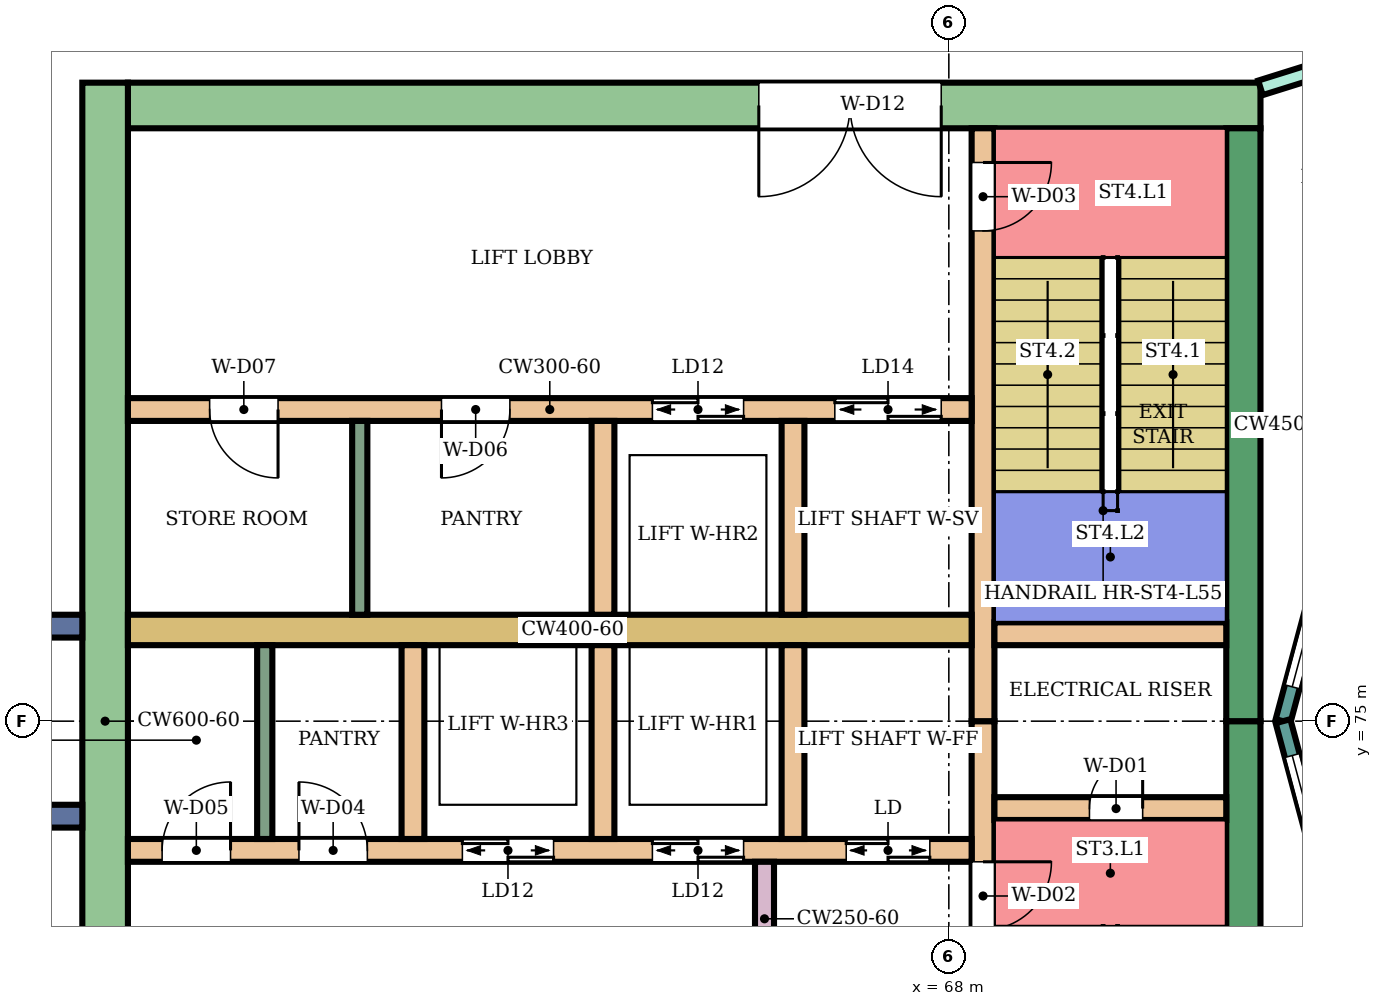
"""IFC4 building model, lengths in metres.
Left out: names, types, materials, properties, quantities, classifications, styles, units other than length and angle.
Written with IfcOpenShell. Run it as: python <this file> out.ifc"""

import sys

from ifc_helpers import new_model, si_unit, direction, frame, frame_2d, origin, place, context, subcontext, project, spatial, rectangle, extrude, element, fill, save


model = new_model("IFC4")
c1 = context("Model", 3, precision=1e-05, world=origin(), true_north=direction((0.0, 1.0)))
c2 = subcontext(c1, "Body", "Model", "MODEL_VIEW")
j1 = project(units=[si_unit("LENGTHUNIT", "METRE"), si_unit("PLANEANGLEUNIT", "RADIAN")], contexts=[c1])
p1 = place(None, origin())
s1 = spatial("IfcSite", under=j1, at=p1, CompositionType="ELEMENT")
p2 = place(p1, origin())
s2 = spatial("IfcBuilding", under=s1, at=p2, CompositionType="ELEMENT")
p3 = place(p2, frame((0.0, 0.0, 241.5)))
s3 = spatial("IfcBuildingStorey", under=s2, at=p3, CompositionType="ELEMENT", Elevation=241.5)
p4 = place(p3, frame((72.1, 83.1, 0.0), z_axis=(0.0, 0.0, 1.0), x_axis=(-1.0, 0.0, 0.0)))
e1 = element("IfcWall", 1, at=p4, inside=s3, PredefinedType="SHEAR", context=c2, shape_type="SweptSolid", body=[
    extrude(rectangle(XDim=14.9, YDim=0.6, at=frame_2d((7.45, 0.0))), origin(), (0.0, 0.0, 1.0), 3.88),
])
p5 = place(p4, frame((4.2, 0.0, 0.0)))
e2 = element("IfcOpeningElement", 2, at=p5, cuts=e1, PredefinedType="OPENING", context=c2, shape_type="SweptSolid", body=[
    extrude(rectangle(XDim=2.4, YDim=2.4, at=frame_2d((1.2, 1.2))), frame((0.0, 0.31, 0.0), z_axis=(0.0, -1.0, 0.0), x_axis=(1.0, 0.0, 0.0)), (0.0, 0.0, 1.0), 0.62),
])
for number, where, z_axis, x_axis in (
    (3, (71.875, 75.0, 0.0), (0.0, 0.0, 1.0), (0.0, -1.0, 0.0)),
    (4, (71.875, 82.8, 0.0), (0.0, 0.0, 1.0), (0.0, -1.0, 0.0)),
):
    element("IfcWall", number, at=place(p3, frame(where, z_axis=z_axis, x_axis=x_axis)), inside=s3, PredefinedType="SHEAR", context=c2, shape_type="SweptSolid", body=[
        extrude(rectangle(XDim=7.8, YDim=0.45, at=frame_2d((3.9, 0.0))), origin(), (0.0, 0.0, 1.0), 3.88),
    ])
p6 = place(p3, frame((56.9, 83.4, 0.0), z_axis=(0.0, 0.0, 1.0), x_axis=(0.0, -1.0, 0.0)))
e5 = element("IfcWall", 5, at=p6, inside=s3, PredefinedType="SHEAR", context=c2, shape_type="SweptSolid", body=[
    extrude(rectangle(XDim=16.8, YDim=0.6, at=frame_2d((8.4, 0.0))), origin(), (0.0, 0.0, 1.0), 3.88),
])
p7 = place(p3, frame((68.45, 75.0, 0.0), z_axis=(0.0, 0.0, 1.0), x_axis=(0.0, -1.0, 0.0)))
e6 = element("IfcWall", 6, at=p7, inside=s3, PredefinedType="SHEAR", context=c2, shape_type="SweptSolid", body=[
    extrude(rectangle(XDim=7.8, YDim=0.3, at=frame_2d((3.9, 0.0))), origin(), (0.0, 0.0, 1.0), 3.88),
])
p8 = place(p7, frame((1.85, 0.0, 0.0)))
e7 = element("IfcOpeningElement", 7, at=p8, cuts=e6, PredefinedType="OPENING", context=c2, shape_type="SweptSolid", body=[
    extrude(rectangle(XDim=0.9, YDim=2.1, at=frame_2d((0.45, 1.05))), frame((0.0, 0.16, 0.0), z_axis=(0.0, -1.0, 0.0), x_axis=(1.0, 0.0, 0.0)), (0.0, 0.0, 1.0), 0.32),
])
p9 = place(p3, frame((68.45, 82.8, 0.0), z_axis=(0.0, 0.0, 1.0), x_axis=(0.0, -1.0, 0.0)))
e8 = element("IfcWall", 8, at=p9, inside=s3, PredefinedType="SHEAR", context=c2, shape_type="SweptSolid", body=[
    extrude(rectangle(XDim=7.8, YDim=0.3, at=frame_2d((3.9, 0.0))), origin(), (0.0, 0.0, 1.0), 3.88),
])
p10 = place(p9, frame((0.45, 0.0, 0.0)))
e9 = element("IfcOpeningElement", 9, at=p10, cuts=e8, PredefinedType="OPENING", context=c2, shape_type="SweptSolid", body=[
    extrude(rectangle(XDim=0.9, YDim=2.1, at=frame_2d((0.45, 1.05))), frame((0.0, 0.16, 0.0), z_axis=(0.0, -1.0, 0.0), x_axis=(1.0, 0.0, 0.0)), (0.0, 0.0, 1.0), 0.32),
])
p11 = place(p3, frame((71.65, 73.85, 0.0), z_axis=(0.0, 0.0, 1.0), x_axis=(-1.0, 0.0, 0.0)))
e10 = element("IfcWall", 10, at=p11, inside=s3, PredefinedType="SHEAR", context=c2, shape_type="SweptSolid", body=[
    extrude(rectangle(XDim=3.05, YDim=0.3, at=frame_2d((1.525, 0.0))), origin(), (0.0, 0.0, 1.0), 3.88),
])
p12 = place(p11, frame((1.1, 0.0, 0.0)))
e11 = element("IfcOpeningElement", 11, at=p12, cuts=e10, PredefinedType="OPENING", context=c2, shape_type="SweptSolid", body=[
    extrude(rectangle(XDim=0.7, YDim=2.0, at=frame_2d((0.35, 1.0))), frame((0.0, 0.16, 0.0), z_axis=(0.0, -1.0, 0.0), x_axis=(1.0, 0.0, 0.0)), (0.0, 0.0, 1.0), 0.32),
])
p13 = place(p3, frame((71.65, 76.15, 0.0), z_axis=(0.0, 0.0, 1.0), x_axis=(-1.0, 0.0, 0.0)))
e12 = element("IfcWall", 12, at=p13, inside=s3, PredefinedType="SHEAR", context=c2, shape_type="SweptSolid", body=[
    extrude(rectangle(XDim=3.05, YDim=0.3, at=frame_2d((1.525, 0.0))), origin(), (0.0, 0.0, 1.0), 3.88),
])
p14 = place(p3, frame((68.3, 73.3, 0.0), z_axis=(0.0, 0.0, 1.0), x_axis=(-1.0, 0.0, 0.0)))
e13 = element("IfcWall", 13, at=p14, inside=s3, PredefinedType="SHEAR", context=c2, shape_type="SweptSolid", body=[
    extrude(rectangle(XDim=11.1, YDim=0.3, at=frame_2d((5.55, 0.0))), origin(), (0.0, 0.0, 1.0), 3.88),
])
p15 = place(p14, frame((0.55, 0.0, 0.0)))
e14 = element("IfcOpeningElement", 14, at=p15, cuts=e13, PredefinedType="OPENING", context=c2, shape_type="SweptSolid", body=[
    extrude(rectangle(XDim=1.1, YDim=2.1, at=frame_2d((0.55, 1.05))), frame((0.0, 0.16, 0.0), z_axis=(0.0, -1.0, 0.0), x_axis=(1.0, 0.0, 0.0)), (0.0, 0.0, 1.0), 0.32),
])
p16 = place(p14, frame((3.0, 0.0, 0.0)))
e15 = element("IfcOpeningElement", 15, at=p16, cuts=e13, PredefinedType="OPENING", context=c2, shape_type="SweptSolid", body=[
    extrude(rectangle(XDim=1.2, YDim=2.1, at=frame_2d((0.6, 1.05))), frame((0.0, 0.16, 0.0), z_axis=(0.0, -1.0, 0.0), x_axis=(1.0, 0.0, 0.0)), (0.0, 0.0, 1.0), 0.32),
])
p17 = place(p14, frame((5.5, 0.0, 0.0)))
e16 = element("IfcOpeningElement", 16, at=p17, cuts=e13, PredefinedType="OPENING", context=c2, shape_type="SweptSolid", body=[
    extrude(rectangle(XDim=1.2, YDim=2.1, at=frame_2d((0.6, 1.05))), frame((0.0, 0.16, 0.0), z_axis=(0.0, -1.0, 0.0), x_axis=(1.0, 0.0, 0.0)), (0.0, 0.0, 1.0), 0.32),
])
p18 = place(p14, frame((7.95, 0.0, 0.0)))
e17 = element("IfcOpeningElement", 17, at=p18, cuts=e13, PredefinedType="OPENING", context=c2, shape_type="SweptSolid", body=[
    extrude(rectangle(XDim=0.9, YDim=2.1, at=frame_2d((0.45, 1.05))), frame((0.0, 0.16, 0.0), z_axis=(0.0, -1.0, 0.0), x_axis=(1.0, 0.0, 0.0)), (0.0, 0.0, 1.0), 0.32),
])
p19 = place(p14, frame((9.75, 0.0, 0.0)))
e18 = element("IfcOpeningElement", 18, at=p19, cuts=e13, PredefinedType="OPENING", context=c2, shape_type="SweptSolid", body=[
    extrude(rectangle(XDim=0.9, YDim=2.1, at=frame_2d((0.45, 1.05))), frame((0.0, 0.16, 0.0), z_axis=(0.0, -1.0, 0.0), x_axis=(1.0, 0.0, 0.0)), (0.0, 0.0, 1.0), 0.32),
])
p20 = place(p3, frame((68.3, 76.2, 0.0), z_axis=(0.0, 0.0, 1.0), x_axis=(-1.0, 0.0, 0.0)))
e19 = element("IfcWall", 19, at=p20, inside=s3, PredefinedType="SHEAR", context=c2, shape_type="SweptSolid", body=[
    extrude(rectangle(XDim=11.1, YDim=0.4, at=frame_2d((5.55, 0.0))), origin(), (0.0, 0.0, 1.0), 3.88),
])
p21 = place(p3, frame((68.3, 79.1, 0.0), z_axis=(0.0, 0.0, 1.0), x_axis=(-1.0, 0.0, 0.0)))
e20 = element("IfcWall", 20, at=p21, inside=s3, PredefinedType="SHEAR", context=c2, shape_type="SweptSolid", body=[
    extrude(rectangle(XDim=11.1, YDim=0.3, at=frame_2d((5.55, 0.0))), origin(), (0.0, 0.0, 1.0), 3.88),
])
p22 = place(p21, frame((0.4, 0.0, 0.0)))
e21 = element("IfcOpeningElement", 21, at=p22, cuts=e20, PredefinedType="OPENING", context=c2, shape_type="SweptSolid", body=[
    extrude(rectangle(XDim=1.4, YDim=2.1, at=frame_2d((0.7, 1.05))), frame((0.0, 0.16, 0.0), z_axis=(0.0, -1.0, 0.0), x_axis=(1.0, 0.0, 0.0)), (0.0, 0.0, 1.0), 0.32),
])
p23 = place(p21, frame((3.0, 0.0, 0.0)))
e22 = element("IfcOpeningElement", 22, at=p23, cuts=e20, PredefinedType="OPENING", context=c2, shape_type="SweptSolid", body=[
    extrude(rectangle(XDim=1.2, YDim=2.1, at=frame_2d((0.6, 1.05))), frame((0.0, 0.16, 0.0), z_axis=(0.0, -1.0, 0.0), x_axis=(1.0, 0.0, 0.0)), (0.0, 0.0, 1.0), 0.32),
])
p24 = place(p21, frame((6.075, 0.0, 0.0)))
e23 = element("IfcOpeningElement", 23, at=p24, cuts=e20, PredefinedType="OPENING", context=c2, shape_type="SweptSolid", body=[
    extrude(rectangle(XDim=0.9, YDim=2.1, at=frame_2d((0.45, 1.05))), frame((0.0, 0.16, 0.0), z_axis=(0.0, -1.0, 0.0), x_axis=(1.0, 0.0, 0.0)), (0.0, 0.0, 1.0), 0.32),
])
p25 = place(p21, frame((9.125, 0.0, 0.0)))
e24 = element("IfcOpeningElement", 24, at=p25, cuts=e20, PredefinedType="OPENING", context=c2, shape_type="SweptSolid", body=[
    extrude(rectangle(XDim=0.9, YDim=2.1, at=frame_2d((0.45, 1.05))), frame((0.0, 0.16, 0.0), z_axis=(0.0, -1.0, 0.0), x_axis=(1.0, 0.0, 0.0)), (0.0, 0.0, 1.0), 0.32),
])
for number, where, z_axis, x_axis in (
    (25, (65.95, 76.0, 0.0), (0.0, 0.0, 1.0), (0.0, -1.0, 0.0)),
    (26, (63.45, 76.0, 0.0), (0.0, 0.0, 1.0), (0.0, -1.0, 0.0)),
    (27, (60.95, 76.0, 0.0), (0.0, 0.0, 1.0), (0.0, -1.0, 0.0)),
    (28, (65.95, 78.95, 0.0), (0.0, 0.0, 1.0), (0.0, -1.0, 0.0)),
    (29, (63.45, 78.95, 0.0), (0.0, 0.0, 1.0), (0.0, -1.0, 0.0)),
):
    element("IfcWall", number, at=place(p3, frame(where, z_axis=z_axis, x_axis=x_axis)), inside=s3, PredefinedType="SHEAR", context=c2, shape_type="SweptSolid", body=[
        extrude(rectangle(XDim=2.55, YDim=0.3, at=frame_2d((1.275, 0.0))), origin(), (0.0, 0.0, 1.0), 3.88),
    ])
p26 = place(p3, frame((65.575, 73.15, 0.0), z_axis=(0.0, 0.0, 1.0), x_axis=(0.0, -1.0, 0.0)))
e30 = element("IfcWall", 30, at=p26, inside=s3, PredefinedType="SHEAR", context=c2, shape_type="SweptSolid", body=[
    extrude(rectangle(XDim=1.5, YDim=0.25, at=frame_2d((0.75, 0.0))), origin(), (0.0, 0.0, 1.0), 3.88),
])
for number, where, z_axis, x_axis in (
    (31, (56.6, 76.25, 0.0), (0.0, 0.0, 1.0), (-1.0, 0.0, 0.0)),
    (32, (56.6, 73.75, 0.0), (0.0, 0.0, 1.0), (-1.0, 0.0, 0.0)),
):
    element("IfcWall", number, at=place(p3, frame(where, z_axis=z_axis, x_axis=x_axis)), inside=s3, PredefinedType="NOTDEFINED", context=c2, shape_type="SweptSolid", body=[
        extrude(rectangle(XDim=2.416, YDim=0.3, at=frame_2d((1.208, 0.0))), origin(), (0.0, 0.0, 1.0), 4.2),
    ])
p27 = place(p3, frame((73.415, 78.802, 0.0), z_axis=(0.0, 0.0, 1.0), x_axis=(-0.258789828301, -0.965933654434, 0.0)))
e33 = element("IfcWall", 33, at=p27, inside=s3, PredefinedType="NOTDEFINED", context=c2, shape_type="SweptSolid", body=[
    extrude(rectangle(XDim=3.936, YDim=0.2, at=frame_2d((1.968, 0.0))), origin(), (0.0, 0.0, 1.0), 4.2),
])
p28 = place(p27, frame((0.468, 0.0, 0.9)))
e34 = element("IfcOpeningElement", 34, at=p28, cuts=e33, PredefinedType="OPENING", context=c2, shape_type="SweptSolid", body=[
    extrude(rectangle(XDim=3.0, YDim=2.3, at=frame_2d((1.5, 1.15))), frame((0.0, 0.11, 0.0), z_axis=(0.0, -1.0, 0.0), x_axis=(1.0, 0.0, 0.0)), (0.0, 0.0, 1.0), 0.22),
])
p29 = place(p3, frame((72.396, 75.0, 0.0), z_axis=(0.0, 0.0, 1.0), x_axis=(0.258789828301, -0.965933654434, 0.0)))
e35 = element("IfcWall", 35, at=p29, inside=s3, PredefinedType="NOTDEFINED", context=c2, shape_type="SweptSolid", body=[
    extrude(rectangle(XDim=3.936, YDim=0.2, at=frame_2d((1.968, 0.0))), origin(), (0.0, 0.0, 1.0), 4.2),
])
p30 = place(p29, frame((0.468, 0.0, 0.9)))
e36 = element("IfcOpeningElement", 36, at=p30, cuts=e35, PredefinedType="OPENING", context=c2, shape_type="SweptSolid", body=[
    extrude(rectangle(XDim=3.0, YDim=2.3, at=frame_2d((1.5, 1.15))), frame((0.0, 0.11, 0.0), z_axis=(0.0, -1.0, 0.0), x_axis=(1.0, 0.0, 0.0)), (0.0, 0.0, 1.0), 0.22),
])
p31 = place(p3, frame((72.1, 83.332, 0.0), z_axis=(0.0, 0.0, 1.0), x_axis=(0.954233106619, 0.299063836383, 0.0)))
e37 = element("IfcWall", 37, at=p31, inside=s3, PredefinedType="PARTITIONING", context=c2, shape_type="SweptSolid", body=[
    extrude(rectangle(XDim=2.414, YDim=0.2, at=frame_2d((1.207, 0.0))), origin(), (0.0, 0.0, 1.0), 3.75),
])
p32 = place(p31, frame((0.762, 0.0, 0.0)))
e38 = element("IfcOpeningElement", 38, at=p32, cuts=e37, PredefinedType="OPENING", context=c2, shape_type="SweptSolid", body=[
    extrude(rectangle(XDim=0.9, YDim=2.1, at=frame_2d((0.45, 1.05))), frame((0.0, 0.11, 0.0), z_axis=(0.0, -1.0, 0.0), x_axis=(1.0, 0.0, 0.0)), (0.0, 0.0, 1.0), 0.22),
])
for number, where, z_axis, x_axis in (
    (39, (59.0, 76.0, 0.0), (0.0, 0.0, 1.0), (0.0, -1.0, 0.0)),
    (40, (60.25, 78.95, 0.0), (0.0, 0.0, 1.0), (0.0, -1.0, 0.0)),
):
    element("IfcWall", number, at=place(p3, frame(where, z_axis=z_axis, x_axis=x_axis)), inside=s3, PredefinedType="PARTITIONING", context=c2, shape_type="SweptSolid", body=[
        extrude(rectangle(XDim=2.55, YDim=0.2, at=frame_2d((1.275, 0.0))), origin(), (0.0, 0.0, 1.0), 3.88),
    ])
p33 = place(p28, origin())
e41 = element("IfcWindow", 41, at=p33, inside=s3, PartitioningType="SINGLE_PANEL", PredefinedType="WINDOW", context=c2, shape_type="SweptSolid", body=[
    extrude(rectangle(XDim=3.0, YDim=2.3, at=frame_2d((1.5, 1.15))), frame((0.0, 0.03, 0.0), z_axis=(0.0, -1.0, 0.0), x_axis=(1.0, 0.0, 0.0)), (0.0, 0.0, 1.0), 0.06),
])
fill(e34, e41)
p34 = place(p30, origin())
e42 = element("IfcWindow", 42, at=p34, inside=s3, PartitioningType="SINGLE_PANEL", PredefinedType="WINDOW", context=c2, shape_type="SweptSolid", body=[
    extrude(rectangle(XDim=3.0, YDim=2.3, at=frame_2d((1.5, 1.15))), frame((0.0, 0.03, 0.0), z_axis=(0.0, -1.0, 0.0), x_axis=(1.0, 0.0, 0.0)), (0.0, 0.0, 1.0), 0.06),
])
fill(e36, e42)
p35 = place(p12, frame((0.7, 0.0, 0.0), z_axis=(0.0, 0.0, 1.0), x_axis=(-1.0, 0.0, 0.0)))
e43 = element("IfcDoor", 43, at=p35, inside=s3, OperationType="SINGLE_SWING_RIGHT", PredefinedType="DOOR", context=c2, shape_type="SweptSolid", body=[
    extrude(rectangle(XDim=0.7, YDim=2.0, at=frame_2d((0.35, 1.0))), frame((0.0, 0.025, 0.0), z_axis=(0.0, -1.0, 0.0), x_axis=(1.0, 0.0, 0.0)), (0.0, 0.0, 1.0), 0.05),
])
fill(e11, e43)
p36 = place(p8, origin())
e44 = element("IfcDoor", 44, at=p36, inside=s3, OperationType="SINGLE_SWING_LEFT", PredefinedType="DOOR", context=c2, shape_type="SweptSolid", body=[
    extrude(rectangle(XDim=0.9, YDim=2.1, at=frame_2d((0.45, 1.05))), frame((0.0, 0.025, 0.0), z_axis=(0.0, -1.0, 0.0), x_axis=(1.0, 0.0, 0.0)), (0.0, 0.0, 1.0), 0.05),
])
fill(e7, e44)
p37 = place(p10, origin())
e45 = element("IfcDoor", 45, at=p37, inside=s3, OperationType="SINGLE_SWING_LEFT", PredefinedType="DOOR", context=c2, shape_type="SweptSolid", body=[
    extrude(rectangle(XDim=0.9, YDim=2.1, at=frame_2d((0.45, 1.05))), frame((0.0, 0.025, 0.0), z_axis=(0.0, -1.0, 0.0), x_axis=(1.0, 0.0, 0.0)), (0.0, 0.0, 1.0), 0.05),
])
fill(e9, e45)
p38 = place(p15, origin())
e46 = element("IfcDoor", 46, at=p38, inside=s3, OperationType="DOUBLE_DOOR_SLIDING", PredefinedType="DOOR", context=c2, shape_type="SweptSolid", body=[
    extrude(rectangle(XDim=1.1, YDim=2.1, at=frame_2d((0.55, 1.05))), frame((0.0, 0.025, 0.0), z_axis=(0.0, -1.0, 0.0), x_axis=(1.0, 0.0, 0.0)), (0.0, 0.0, 1.0), 0.05),
])
fill(e14, e46)
p39 = place(p16, origin())
e47 = element("IfcDoor", 47, at=p39, inside=s3, OperationType="DOUBLE_DOOR_SLIDING", PredefinedType="DOOR", context=c2, shape_type="SweptSolid", body=[
    extrude(rectangle(XDim=1.2, YDim=2.1, at=frame_2d((0.6, 1.05))), frame((0.0, 0.025, 0.0), z_axis=(0.0, -1.0, 0.0), x_axis=(1.0, 0.0, 0.0)), (0.0, 0.0, 1.0), 0.05),
])
fill(e15, e47)
p40 = place(p17, origin())
e48 = element("IfcDoor", 48, at=p40, inside=s3, OperationType="DOUBLE_DOOR_SLIDING", PredefinedType="DOOR", context=c2, shape_type="SweptSolid", body=[
    extrude(rectangle(XDim=1.2, YDim=2.1, at=frame_2d((0.6, 1.05))), frame((0.0, 0.025, 0.0), z_axis=(0.0, -1.0, 0.0), x_axis=(1.0, 0.0, 0.0)), (0.0, 0.0, 1.0), 0.05),
])
fill(e16, e48)
p41 = place(p18, frame((0.9, 0.0, 0.0), z_axis=(0.0, 0.0, 1.0), x_axis=(-1.0, 0.0, 0.0)))
e49 = element("IfcDoor", 49, at=p41, inside=s3, OperationType="SINGLE_SWING_LEFT", PredefinedType="DOOR", context=c2, shape_type="SweptSolid", body=[
    extrude(rectangle(XDim=0.9, YDim=2.1, at=frame_2d((0.45, 1.05))), frame((0.0, 0.025, 0.0), z_axis=(0.0, -1.0, 0.0), x_axis=(1.0, 0.0, 0.0)), (0.0, 0.0, 1.0), 0.05),
])
fill(e17, e49)
p42 = place(p19, frame((0.9, 0.0, 0.0), z_axis=(0.0, 0.0, 1.0), x_axis=(-1.0, 0.0, 0.0)))
e50 = element("IfcDoor", 50, at=p42, inside=s3, OperationType="SINGLE_SWING_RIGHT", PredefinedType="DOOR", context=c2, shape_type="SweptSolid", body=[
    extrude(rectangle(XDim=0.9, YDim=2.1, at=frame_2d((0.45, 1.05))), frame((0.0, 0.025, 0.0), z_axis=(0.0, -1.0, 0.0), x_axis=(1.0, 0.0, 0.0)), (0.0, 0.0, 1.0), 0.05),
])
fill(e18, e50)
p43 = place(p22, origin())
e51 = element("IfcDoor", 51, at=p43, inside=s3, OperationType="DOUBLE_DOOR_SLIDING", PredefinedType="DOOR", context=c2, shape_type="SweptSolid", body=[
    extrude(rectangle(XDim=1.4, YDim=2.1, at=frame_2d((0.7, 1.05))), frame((0.0, 0.025, 0.0), z_axis=(0.0, -1.0, 0.0), x_axis=(1.0, 0.0, 0.0)), (0.0, 0.0, 1.0), 0.05),
])
fill(e21, e51)
p44 = place(p23, origin())
e52 = element("IfcDoor", 52, at=p44, inside=s3, OperationType="DOUBLE_DOOR_SLIDING", PredefinedType="DOOR", context=c2, shape_type="SweptSolid", body=[
    extrude(rectangle(XDim=1.2, YDim=2.1, at=frame_2d((0.6, 1.05))), frame((0.0, 0.025, 0.0), z_axis=(0.0, -1.0, 0.0), x_axis=(1.0, 0.0, 0.0)), (0.0, 0.0, 1.0), 0.05),
])
fill(e22, e52)
p45 = place(p24, origin())
e53 = element("IfcDoor", 53, at=p45, inside=s3, OperationType="SINGLE_SWING_RIGHT", PredefinedType="DOOR", context=c2, shape_type="SweptSolid", body=[
    extrude(rectangle(XDim=0.9, YDim=2.1, at=frame_2d((0.45, 1.05))), frame((0.0, 0.025, 0.0), z_axis=(0.0, -1.0, 0.0), x_axis=(1.0, 0.0, 0.0)), (0.0, 0.0, 1.0), 0.05),
])
fill(e23, e53)
p46 = place(p25, origin())
e54 = element("IfcDoor", 54, at=p46, inside=s3, OperationType="SINGLE_SWING_LEFT", PredefinedType="DOOR", context=c2, shape_type="SweptSolid", body=[
    extrude(rectangle(XDim=0.9, YDim=2.1, at=frame_2d((0.45, 1.05))), frame((0.0, 0.025, 0.0), z_axis=(0.0, -1.0, 0.0), x_axis=(1.0, 0.0, 0.0)), (0.0, 0.0, 1.0), 0.05),
])
fill(e24, e54)
p47 = place(p5, origin())
e55 = element("IfcDoor", 55, at=p47, inside=s3, OperationType="DOUBLE_DOOR_SINGLE_SWING", PredefinedType="DOOR", context=c2, shape_type="SweptSolid", body=[
    extrude(rectangle(XDim=2.4, YDim=2.4, at=frame_2d((1.2, 1.2))), frame((0.0, 0.025, 0.0), z_axis=(0.0, -1.0, 0.0), x_axis=(1.0, 0.0, 0.0)), (0.0, 0.0, 1.0), 0.05),
])
fill(e2, e55)
save(model, sys.argv[1])
